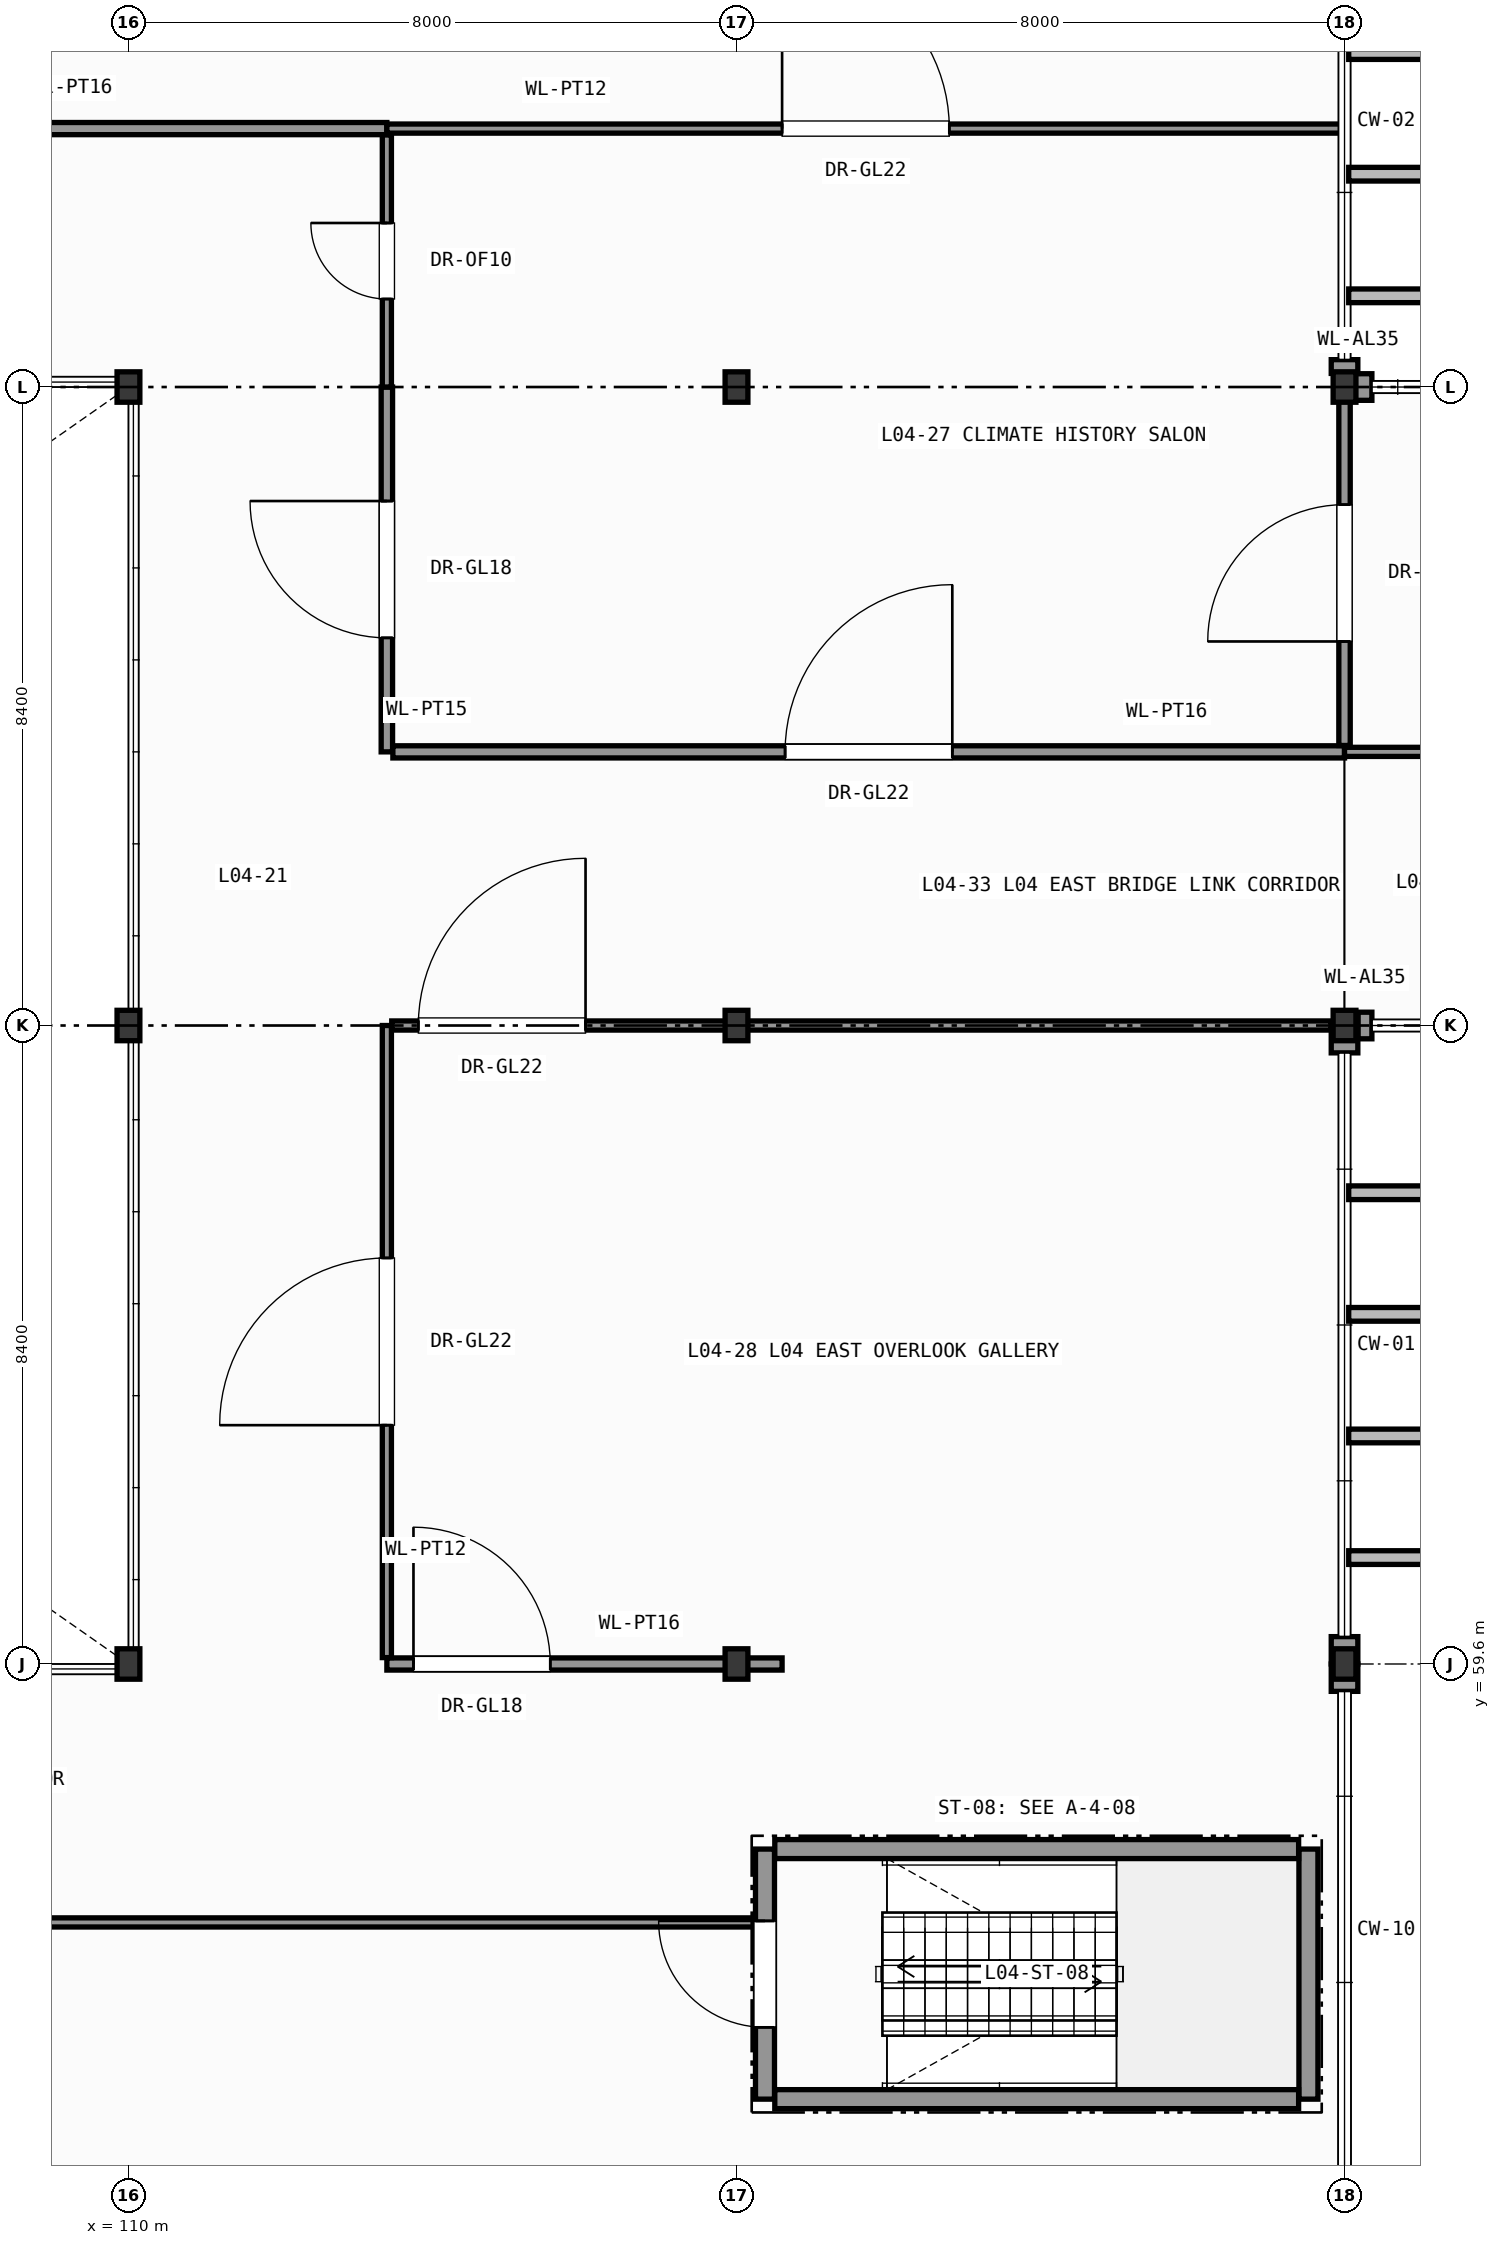
"""IFC4 building model, lengths in metres.
Left out: names, types, materials, properties, quantities, classifications, styles, units other than length and angle.
Written with IfcOpenShell. Run it as: python <this file> out.ifc"""

import sys

from ifc_helpers import new_model, si_unit, direction, frame, frame_2d, origin, origin_2d, place, context, subcontext, project, spatial, rectangle, i_section, extrude, element, fill, save


model = new_model("IFC4")
c1 = context("Model", 3, precision=1e-05, world=origin(), true_north=direction((0.0, 1.0)))
c2 = subcontext(c1, "Body", "Model", "MODEL_VIEW")
j1 = project(units=[si_unit("LENGTHUNIT", "METRE"), si_unit("PLANEANGLEUNIT", "RADIAN")], contexts=[c1])
p1 = place(None, origin())
s1 = spatial("IfcSite", under=j1, at=p1, CompositionType="ELEMENT")
p2 = place(p1, origin())
s2 = spatial("IfcBuilding", under=s1, at=p2, CompositionType="ELEMENT")
p3 = place(p2, frame((0.0, 0.0, 18.0)))
s3 = spatial("IfcBuildingStorey", under=s2, at=p3, CompositionType="ELEMENT", Elevation=18.0)
for number, where, z_axis, x_axis in (
    (1, (110.0, 59.6, 0.0), (0.0, 0.0, 1.0), (1.0, 0.0, 0.0)),
    (2, (110.0, 68.0, 0.0), (0.0, 0.0, 1.0), (1.0, 0.0, 0.0)),
    (3, (110.0, 76.4, 0.0), (0.0, 0.0, 1.0), (1.0, 0.0, 0.0)),
    (4, (118.0, 59.6, 0.0), (0.0, 0.0, 1.0), (1.0, 0.0, 0.0)),
    (5, (118.0, 68.0, 0.0), (0.0, 0.0, 1.0), (1.0, 0.0, 0.0)),
    (6, (118.0, 76.4, 0.0), (0.0, 0.0, 1.0), (1.0, 0.0, 0.0)),
    (7, (126.0, 59.6, 0.0), (0.0, 0.0, 1.0), (1.0, 0.0, 0.0)),
    (8, (126.0, 68.0, 0.0), (0.0, 0.0, 1.0), (1.0, 0.0, 0.0)),
    (9, (126.0, 76.4, 0.0), (0.0, 0.0, 1.0), (1.0, 0.0, 0.0)),
):
    element("IfcColumn", number, at=place(p3, frame(where, z_axis=z_axis, x_axis=x_axis)), inside=s3, PredefinedType="COLUMN", context=c2, shape_type="SweptSolid", body=[
        extrude(i_section(OverallWidth=0.3, OverallDepth=0.4, WebThickness=0.013, FlangeThickness=0.024, FilletRadius=0.027, at=origin_2d()), origin(), (0.0, 0.0, 1.0), 4.2),
    ])
p4 = place(p3, frame((126.0, 59.24, 0.0), z_axis=(0.0, 0.0, 1.0), x_axis=(0.0, 1.0, 0.0)))
e10 = element("IfcWall", 10, at=p4, inside=s3, PredefinedType="SOLIDWALL", context=c2, shape_type="SweptSolid", body=[
    extrude(rectangle(XDim=0.36, YDim=0.35, at=frame_2d((0.18, 0.0))), origin(), (0.0, 0.0, 1.0), 3.525),
])
p5 = place(p3, frame((126.0, 59.6, 0.0), z_axis=(0.0, 0.0, 1.0), x_axis=(0.0, 1.0, 0.0)))
e11 = element("IfcWall", 11, at=p5, inside=s3, PredefinedType="SOLIDWALL", context=c2, shape_type="SweptSolid", body=[
    extrude(rectangle(XDim=0.36, YDim=0.35, at=frame_2d((0.18, 0.0))), origin(), (0.0, 0.0, 1.0), 3.525),
])
p6 = place(p3, frame((126.0, 67.64, 0.0), z_axis=(0.0, 0.0, 1.0), x_axis=(0.0, 1.0, 0.0)))
e12 = element("IfcWall", 12, at=p6, inside=s3, PredefinedType="SOLIDWALL", context=c2, shape_type="SweptSolid", body=[
    extrude(rectangle(XDim=0.36, YDim=0.35, at=frame_2d((0.18, 0.0))), origin(), (0.0, 0.0, 1.0), 3.525),
])
p7 = place(p3, frame((126.179, 68.0, 0.0), z_axis=(0.0, 0.0, 1.0), x_axis=(1.0, 0.0, 0.0)))
e13 = element("IfcWall", 13, at=p7, inside=s3, PredefinedType="SOLIDWALL", context=c2, shape_type="SweptSolid", body=[
    extrude(rectangle(XDim=0.181, YDim=0.35, at=frame_2d((0.091, 0.0))), origin(), (0.0, 0.0, 1.0), 3.98),
])
p8 = place(p3, frame((126.36, 76.4, 0.0), z_axis=(0.0, 0.0, 1.0), x_axis=(-1.0, 0.0, 0.0)))
e14 = element("IfcWall", 14, at=p8, inside=s3, PredefinedType="SOLIDWALL", context=c2, shape_type="SweptSolid", body=[
    extrude(rectangle(XDim=0.36, YDim=0.35, at=frame_2d((0.18, 0.0))), origin(), (0.0, 0.0, 1.0), 3.98),
])
p9 = place(p3, frame((126.0, 76.579, 0.0), z_axis=(0.0, 0.0, 1.0), x_axis=(0.0, 1.0, 0.0)))
e15 = element("IfcWall", 15, at=p9, inside=s3, PredefinedType="SOLIDWALL", context=c2, shape_type="SweptSolid", body=[
    extrude(rectangle(XDim=0.181, YDim=0.35, at=frame_2d((0.09, 0.0))), origin(), (0.0, 0.0, 1.0), 3.98),
])
p10 = place(p3, frame((118.375, 53.875, 0.0), z_axis=(0.0, 0.0, 1.0), x_axis=(0.0, 1.0, 0.0)))
e16 = element("IfcWall", 16, at=p10, inside=s3, PredefinedType="SHEAR", context=c2, shape_type="SweptSolid", body=[
    extrude(rectangle(XDim=3.29, YDim=0.25, at=frame_2d((1.645, 0.0))), origin(), (0.0, 0.0, 1.0), 3.98),
])
p11 = place(p10, frame((0.945, 0.0, 0.0)))
e17 = element("IfcOpeningElement", 17, at=p11, cuts=e16, PredefinedType="OPENING", context=c2, shape_type="SweptSolid", body=[
    extrude(rectangle(XDim=1.4, YDim=2.2, at=frame_2d((0.7, 1.1))), frame((0.0, 0.135, 0.0), z_axis=(0.0, -1.0, 0.0), x_axis=(1.0, 0.0, 0.0)), (0.0, 0.0, 1.0), 0.27),
])
p12 = place(p3, frame((125.525, 53.875, 0.0), z_axis=(0.0, 0.0, 1.0), x_axis=(0.0, 1.0, 0.0)))
e18 = element("IfcWall", 18, at=p12, inside=s3, PredefinedType="SHEAR", context=c2, shape_type="SweptSolid", body=[
    extrude(rectangle(XDim=3.29, YDim=0.25, at=frame_2d((1.645, 0.0))), origin(), (0.0, 0.0, 1.0), 3.98),
])
for number, where, z_axis, x_axis in (
    (19, (118.504, 53.875, 0.0), (0.0, 0.0, 1.0), (1.0, 0.0, 0.0)),
    (20, (118.504, 57.165, 0.0), (0.0, 0.0, 1.0), (1.0, 0.0, 0.0)),
):
    element("IfcWall", number, at=place(p3, frame(where, z_axis=z_axis, x_axis=x_axis)), inside=s3, PredefinedType="SHEAR", context=c2, shape_type="SweptSolid", body=[
        extrude(rectangle(XDim=6.892, YDim=0.25, at=frame_2d((3.446, 0.0))), origin(), (0.0, 0.0, 1.0), 3.98),
    ])
p13 = place(p3, frame((82.6, 56.2, 0.0), z_axis=(0.0, 0.0, 1.0), x_axis=(1.0, 0.0, 0.0)))
e21 = element("IfcWall", 21, at=p13, inside=s3, PredefinedType="PARTITIONING", context=c2, shape_type="SweptSolid", body=[
    extrude(rectangle(XDim=35.646, YDim=0.12, at=frame_2d((17.823, 0.0))), origin(), (0.0, 0.0, 1.0), 3.605),
])
p14 = place(p13, frame((16.723, 0.0, 0.0)))
e22 = element("IfcOpeningElement", 22, at=p14, cuts=e21, PredefinedType="OPENING", context=c2, shape_type="SweptSolid", body=[
    extrude(rectangle(XDim=2.2, YDim=2.6, at=frame_2d((1.1, 1.3))), frame((0.0, 0.07, 0.0), z_axis=(0.0, -1.0, 0.0), x_axis=(1.0, 0.0, 0.0)), (0.0, 0.0, 1.0), 0.14),
])
p15 = place(p3, frame((113.4, 59.6, 0.0), z_axis=(0.0, 0.0, 1.0), x_axis=(1.0, 0.0, 0.0)))
e23 = element("IfcWall", 23, at=p15, inside=s3, PredefinedType="PARTITIONING", context=c2, shape_type="SweptSolid", body=[
    extrude(rectangle(XDim=5.2, YDim=0.16, at=frame_2d((2.6, 0.0))), origin(), (0.0, 0.0, 1.0), 3.575),
])
p16 = place(p15, frame((0.35, 0.0, 0.0)))
e24 = element("IfcOpeningElement", 24, at=p16, cuts=e23, PredefinedType="OPENING", context=c2, shape_type="SweptSolid", body=[
    extrude(rectangle(XDim=1.8, YDim=2.4, at=frame_2d((0.9, 1.2))), frame((0.0, 0.09, 0.0), z_axis=(0.0, -1.0, 0.0), x_axis=(1.0, 0.0, 0.0)), (0.0, 0.0, 1.0), 0.18),
])
p17 = place(p3, frame((113.4, 71.6, 0.0), z_axis=(0.0, 0.0, 1.0), x_axis=(0.0, 1.0, 0.0)))
e25 = element("IfcWall", 25, at=p17, inside=s3, PredefinedType="PARTITIONING", context=c2, shape_type="SweptSolid", body=[
    extrude(rectangle(XDim=4.8, YDim=0.15, at=frame_2d((2.4, 0.0))), origin(), (0.0, 0.0, 1.0), 3.98),
])
p18 = place(p17, frame((1.5, 0.0, 0.0)))
e26 = element("IfcOpeningElement", 26, at=p18, cuts=e25, PredefinedType="OPENING", context=c2, shape_type="SweptSolid", body=[
    extrude(rectangle(XDim=1.8, YDim=2.4, at=frame_2d((0.9, 1.2))), frame((0.0, 0.085, 0.0), z_axis=(0.0, -1.0, 0.0), x_axis=(1.0, 0.0, 0.0)), (0.0, 0.0, 1.0), 0.17),
])
p19 = place(p3, frame((113.4, 59.684, 0.0), z_axis=(0.0, 0.0, 1.0), x_axis=(0.0, 1.0, 0.0)))
e27 = element("IfcWall", 27, at=p19, inside=s3, PredefinedType="PARTITIONING", context=c2, shape_type="SweptSolid", body=[
    extrude(rectangle(XDim=8.316, YDim=0.12, at=frame_2d((4.158, 0.0))), origin(), (0.0, 0.0, 1.0), 3.98),
])
p20 = place(p19, frame((3.058, 0.0, 0.0)))
e28 = element("IfcOpeningElement", 28, at=p20, cuts=e27, PredefinedType="OPENING", context=c2, shape_type="SweptSolid", body=[
    extrude(rectangle(XDim=2.2, YDim=2.6, at=frame_2d((1.1, 1.3))), frame((0.0, 0.07, 0.0), z_axis=(0.0, -1.0, 0.0), x_axis=(1.0, 0.0, 0.0)), (0.0, 0.0, 1.0), 0.14),
])
p21 = place(p3, frame((93.654, 79.8, 0.0), z_axis=(0.0, 0.0, 1.0), x_axis=(1.0, 0.0, 0.0)))
e29 = element("IfcWall", 29, at=p21, inside=s3, PredefinedType="PARTITIONING", context=c2, shape_type="SweptSolid", body=[
    extrude(rectangle(XDim=19.746, YDim=0.16, at=frame_2d((9.873, 0.0))), origin(), (0.0, 0.0, 1.0), 3.605),
])
p22 = place(p21, frame((8.773, 0.0, 0.0)))
e30 = element("IfcOpeningElement", 30, at=p22, cuts=e29, PredefinedType="OPENING", context=c2, shape_type="SweptSolid", body=[
    extrude(rectangle(XDim=2.2, YDim=2.6, at=frame_2d((1.1, 1.3))), frame((0.0, 0.09, 0.0), z_axis=(0.0, -1.0, 0.0), x_axis=(1.0, 0.0, 0.0)), (0.0, 0.0, 1.0), 0.18),
])
p23 = place(p3, frame((113.4, 76.4, 0.0), z_axis=(0.0, 0.0, 1.0), x_axis=(0.0, 1.0, 0.0)))
e31 = element("IfcWall", 31, at=p23, inside=s3, PredefinedType="PARTITIONING", context=c2, shape_type="SweptSolid", body=[
    extrude(rectangle(XDim=3.316, YDim=0.12, at=frame_2d((1.658, 0.0))), origin(), (0.0, 0.0, 1.0), 3.98),
])
p24 = place(p23, frame((1.158, 0.0, 0.0)))
e32 = element("IfcOpeningElement", 32, at=p24, cuts=e31, PredefinedType="OPENING", context=c2, shape_type="SweptSolid", body=[
    extrude(rectangle(XDim=1.0, YDim=2.15, at=frame_2d((0.5, 1.075))), frame((0.0, 0.07, 0.0), z_axis=(0.0, -1.0, 0.0), x_axis=(1.0, 0.0, 0.0)), (0.0, 0.0, 1.0), 0.14),
])
p25 = place(p3, frame((113.4, 79.8, 0.0), z_axis=(0.0, 0.0, 1.0), x_axis=(1.0, 0.0, 0.0)))
e33 = element("IfcWall", 33, at=p25, inside=s3, PredefinedType="PARTITIONING", context=c2, shape_type="SweptSolid", body=[
    extrude(rectangle(XDim=12.6, YDim=0.12, at=frame_2d((6.3, 0.0))), origin(), (0.0, 0.0, 1.0), 3.605),
])
p26 = place(p25, frame((5.2, 0.0, 0.0)))
e34 = element("IfcOpeningElement", 34, at=p26, cuts=e33, PredefinedType="OPENING", context=c2, shape_type="SweptSolid", body=[
    extrude(rectangle(XDim=2.2, YDim=2.6, at=frame_2d((1.1, 1.3))), frame((0.0, 0.07, 0.0), z_axis=(0.0, -1.0, 0.0), x_axis=(1.0, 0.0, 0.0)), (0.0, 0.0, 1.0), 0.14),
])
p27 = place(p3, frame((113.479, 71.6, 0.0), z_axis=(0.0, 0.0, 1.0), x_axis=(1.0, 0.0, 0.0)))
e35 = element("IfcWall", 35, at=p27, inside=s3, PredefinedType="PARTITIONING", context=c2, shape_type="SweptSolid", body=[
    extrude(rectangle(XDim=12.521, YDim=0.16, at=frame_2d((6.26, 0.0))), origin(), (0.0, 0.0, 1.0), 3.98),
])
p28 = place(p27, frame((5.16, 0.0, 0.0)))
e36 = element("IfcOpeningElement", 36, at=p28, cuts=e35, PredefinedType="OPENING", context=c2, shape_type="SweptSolid", body=[
    extrude(rectangle(XDim=2.2, YDim=2.6, at=frame_2d((1.1, 1.3))), frame((0.0, 0.09, 0.0), z_axis=(0.0, -1.0, 0.0), x_axis=(1.0, 0.0, 0.0)), (0.0, 0.0, 1.0), 0.18),
])
p29 = place(p3, frame((126.0, 71.684, 0.0), z_axis=(0.0, 0.0, 1.0), x_axis=(0.0, 1.0, 0.0)))
e37 = element("IfcWall", 37, at=p29, inside=s3, PredefinedType="PARTITIONING", context=c2, shape_type="SweptSolid", body=[
    extrude(rectangle(XDim=4.537, YDim=0.15, at=frame_2d((2.269, 0.0))), origin(), (0.0, 0.0, 1.0), 3.525),
])
p30 = place(p29, frame((1.368, 0.0, 0.0)))
e38 = element("IfcOpeningElement", 38, at=p30, cuts=e37, PredefinedType="OPENING", context=c2, shape_type="SweptSolid", body=[
    extrude(rectangle(XDim=1.8, YDim=2.4, at=frame_2d((0.9, 1.2))), frame((0.0, 0.085, 0.0), z_axis=(0.0, -1.0, 0.0), x_axis=(1.0, 0.0, 0.0)), (0.0, 0.0, 1.0), 0.17),
])
p31 = place(p3, frame((113.464, 68.0, 0.0), z_axis=(0.0, 0.0, 1.0), x_axis=(1.0, 0.0, 0.0)))
e39 = element("IfcWall", 39, at=p31, inside=s3, PredefinedType="PARTITIONING", context=c2, shape_type="SweptSolid", body=[
    extrude(rectangle(XDim=12.357, YDim=0.12, at=frame_2d((6.178, 0.0))), origin(), (0.0, 0.0, 1.0), 3.465),
])
p32 = place(p31, frame((0.35, 0.0, 0.0)))
e40 = element("IfcOpeningElement", 40, at=p32, cuts=e39, PredefinedType="OPENING", context=c2, shape_type="SweptSolid", body=[
    extrude(rectangle(XDim=2.2, YDim=2.6, at=frame_2d((1.1, 1.3))), frame((0.0, 0.07, 0.0), z_axis=(0.0, -1.0, 0.0), x_axis=(1.0, 0.0, 0.0)), (0.0, 0.0, 1.0), 0.14),
])
p33 = place(p3, frame((126.0, 71.6, 0.0), z_axis=(0.0, 0.0, 1.0), x_axis=(1.0, 0.0, 0.0)))
e41 = element("IfcWall", 41, at=p33, inside=s3, PredefinedType="PARTITIONING", context=c2, shape_type="SweptSolid", body=[
    extrude(rectangle(XDim=41.0, YDim=0.12, at=frame_2d((20.5, 0.0))), origin(), (0.0, 0.0, 1.0), 3.98),
])
p34 = place(p33, frame((19.4, 0.0, 0.0)))
e42 = element("IfcOpeningElement", 42, at=p34, cuts=e41, PredefinedType="OPENING", context=c2, shape_type="SweptSolid", body=[
    extrude(rectangle(XDim=2.2, YDim=2.6, at=frame_2d((1.1, 1.3))), frame((0.0, 0.07, 0.0), z_axis=(0.0, -1.0, 0.0), x_axis=(1.0, 0.0, 0.0)), (0.0, 0.0, 1.0), 0.14),
])
p35 = place(p11, origin())
e43 = element("IfcDoor", 43, at=p35, inside=s3, OperationType="SINGLE_SWING_RIGHT", PredefinedType="DOOR", context=c2, shape_type="SweptSolid", body=[
    extrude(rectangle(XDim=1.4, YDim=2.2, at=frame_2d((0.7, 1.1))), frame((0.0, 0.025, 0.0), z_axis=(0.0, -1.0, 0.0), x_axis=(1.0, 0.0, 0.0)), (0.0, 0.0, 1.0), 0.05),
])
fill(e17, e43)
p36 = place(p16, origin())
e44 = element("IfcDoor", 44, at=p36, inside=s3, OperationType="SINGLE_SWING_LEFT", PredefinedType="DOOR", context=c2, shape_type="SweptSolid", body=[
    extrude(rectangle(XDim=1.8, YDim=2.4, at=frame_2d((0.9, 1.2))), frame((0.0, 0.025, 0.0), z_axis=(0.0, -1.0, 0.0), x_axis=(1.0, 0.0, 0.0)), (0.0, 0.0, 1.0), 0.05),
])
fill(e24, e44)
p37 = place(p18, origin())
e45 = element("IfcDoor", 45, at=p37, inside=s3, OperationType="SINGLE_SWING_RIGHT", PredefinedType="DOOR", context=c2, shape_type="SweptSolid", body=[
    extrude(rectangle(XDim=1.8, YDim=2.4, at=frame_2d((0.9, 1.2))), frame((0.0, 0.025, 0.0), z_axis=(0.0, -1.0, 0.0), x_axis=(1.0, 0.0, 0.0)), (0.0, 0.0, 1.0), 0.05),
])
fill(e26, e45)
p38 = place(p20, origin())
e46 = element("IfcDoor", 46, at=p38, inside=s3, OperationType="SINGLE_SWING_LEFT", PredefinedType="DOOR", context=c2, shape_type="SweptSolid", body=[
    extrude(rectangle(XDim=2.2, YDim=2.6, at=frame_2d((1.1, 1.3))), frame((0.0, 0.025, 0.0), z_axis=(0.0, -1.0, 0.0), x_axis=(1.0, 0.0, 0.0)), (0.0, 0.0, 1.0), 0.05),
])
fill(e28, e46)
p39 = place(p24, origin())
e47 = element("IfcDoor", 47, at=p39, inside=s3, OperationType="SINGLE_SWING_RIGHT", PredefinedType="DOOR", context=c2, shape_type="SweptSolid", body=[
    extrude(rectangle(XDim=1.0, YDim=2.15, at=frame_2d((0.5, 1.075))), frame((0.0, 0.025, 0.0), z_axis=(0.0, -1.0, 0.0), x_axis=(1.0, 0.0, 0.0)), (0.0, 0.0, 1.0), 0.05),
])
fill(e32, e47)
p40 = place(p26, origin())
e48 = element("IfcDoor", 48, at=p40, inside=s3, OperationType="SINGLE_SWING_LEFT", PredefinedType="DOOR", context=c2, shape_type="SweptSolid", body=[
    extrude(rectangle(XDim=2.2, YDim=2.6, at=frame_2d((1.1, 1.3))), frame((0.0, 0.025, 0.0), z_axis=(0.0, -1.0, 0.0), x_axis=(1.0, 0.0, 0.0)), (0.0, 0.0, 1.0), 0.05),
])
fill(e34, e48)
p41 = place(p28, origin())
e49 = element("IfcDoor", 49, at=p41, inside=s3, OperationType="SINGLE_SWING_RIGHT", PredefinedType="DOOR", context=c2, shape_type="SweptSolid", body=[
    extrude(rectangle(XDim=2.2, YDim=2.6, at=frame_2d((1.1, 1.3))), frame((0.0, 0.025, 0.0), z_axis=(0.0, -1.0, 0.0), x_axis=(1.0, 0.0, 0.0)), (0.0, 0.0, 1.0), 0.05),
])
fill(e36, e49)
p42 = place(p30, origin())
e50 = element("IfcDoor", 50, at=p42, inside=s3, OperationType="SINGLE_SWING_LEFT", PredefinedType="DOOR", context=c2, shape_type="SweptSolid", body=[
    extrude(rectangle(XDim=1.8, YDim=2.4, at=frame_2d((0.9, 1.2))), frame((0.0, 0.025, 0.0), z_axis=(0.0, -1.0, 0.0), x_axis=(1.0, 0.0, 0.0)), (0.0, 0.0, 1.0), 0.05),
])
fill(e38, e50)
p43 = place(p32, origin())
e51 = element("IfcDoor", 51, at=p43, inside=s3, OperationType="SINGLE_SWING_RIGHT", PredefinedType="DOOR", context=c2, shape_type="SweptSolid", body=[
    extrude(rectangle(XDim=2.2, YDim=2.6, at=frame_2d((1.1, 1.3))), frame((0.0, 0.025, 0.0), z_axis=(0.0, -1.0, 0.0), x_axis=(1.0, 0.0, 0.0)), (0.0, 0.0, 1.0), 0.05),
])
fill(e40, e51)
save(model, sys.argv[1])
